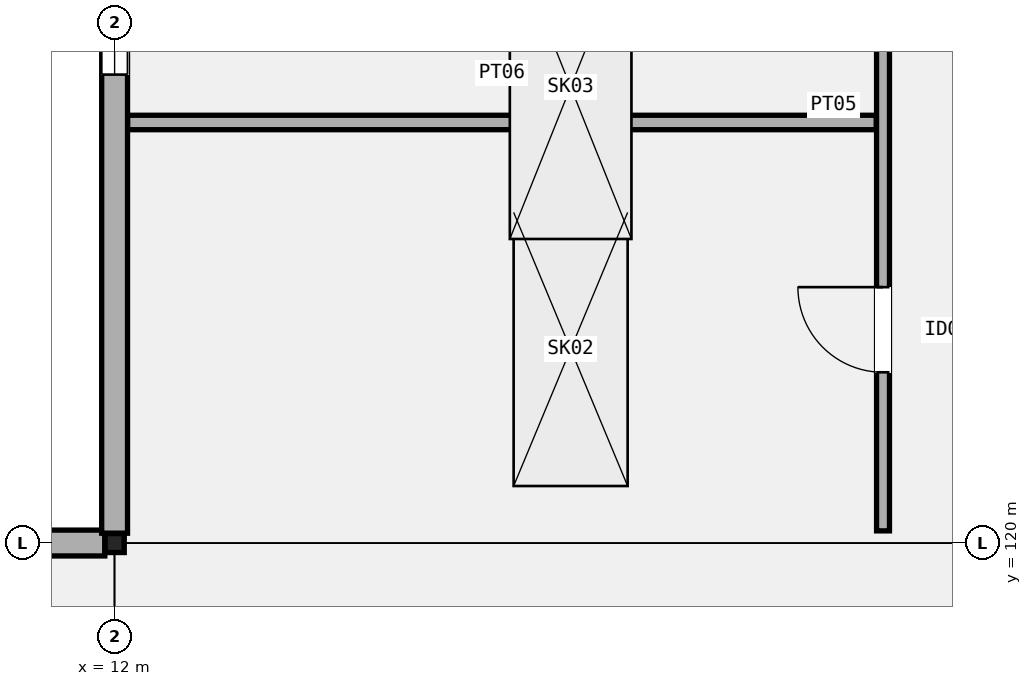
"""IFC4 building model, lengths in metres.
Left out: names, types, materials, properties, quantities, classifications, styles, units other than length and angle.
Written with IfcOpenShell. Run it as: python <this file> out.ifc"""

import sys

from ifc_helpers import new_model, si_unit, direction, frame, frame_2d, origin, origin_2d, place, context, subcontext, project, spatial, rectangle, hollow_rectangle, extrude, element, fill, save


model = new_model("IFC4")
c1 = context("Model", 3, precision=1e-05, world=origin(), true_north=direction((0.0, 1.0)))
c2 = subcontext(c1, "Body", "Model", "MODEL_VIEW")
j1 = project(units=[si_unit("LENGTHUNIT", "METRE"), si_unit("PLANEANGLEUNIT", "RADIAN")], contexts=[c1])
p1 = place(None, origin())
s1 = spatial("IfcSite", under=j1, at=p1, CompositionType="ELEMENT")
p2 = place(p1, origin())
s2 = spatial("IfcBuilding", under=s1, at=p2, CompositionType="ELEMENT")
p3 = place(p2, frame((0.0, 0.0, 25.8)))
s3 = spatial("IfcBuildingStorey", under=s2, at=p3, CompositionType="ELEMENT", Elevation=25.8)
p4 = place(p3, frame((12.0, 120.0, 0.0), z_axis=(0.0, 0.0, 1.0), x_axis=(1.0, 0.0, 0.0)))
e1 = element("IfcColumn", 1, at=p4, inside=s3, PredefinedType="COLUMN", context=c2, shape_type="SweptSolid", body=[
    extrude(hollow_rectangle(XDim=0.25, YDim=0.25, WallThickness=0.012, InnerFilletRadius=0.012, OuterFilletRadius=0.024, at=origin_2d()), origin(), (0.0, 0.0, 1.0), 5.4),
])
p5 = place(p3, frame((0.154, 120.0, 0.0), z_axis=(0.0, 0.0, 1.0), x_axis=(1.0, 0.0, 0.0)))
e2 = element("IfcWall", 2, at=p5, inside=s3, PredefinedType="SOLIDWALL", context=c2, shape_type="SweptSolid", body=[
    extrude(rectangle(XDim=11.717, YDim=0.34, at=frame_2d((5.858, 0.0))), origin(), (0.0, 0.0, 1.0), 4.44),
])
p6 = place(p5, frame((1.5, 0.0, 0.95)))
e3 = element("IfcOpeningElement", 3, at=p6, cuts=e2, PredefinedType="OPENING", context=c2, shape_type="SweptSolid", body=[
    extrude(rectangle(XDim=0.9, YDim=2.7, at=frame_2d((0.45, 1.35))), frame((0.0, 0.18, 0.0), z_axis=(0.0, -1.0, 0.0), x_axis=(1.0, 0.0, 0.0)), (0.0, 0.0, 1.0), 0.36),
])
p7 = place(p3, frame((12.0, 120.129, 0.0), z_axis=(0.0, 0.0, 1.0), x_axis=(0.0, 1.0, 0.0)))
e4 = element("IfcWall", 4, at=p7, inside=s3, PredefinedType="SOLIDWALL", context=c2, shape_type="SweptSolid", body=[
    extrude(rectangle(XDim=11.517, YDim=0.34, at=frame_2d((5.759, 0.0))), origin(), (0.0, 0.0, 1.0), 4.452),
])
p8 = place(p7, frame((6.034, 0.0, 0.95)))
e5 = element("IfcOpeningElement", 5, at=p8, cuts=e4, PredefinedType="OPENING", context=c2, shape_type="SweptSolid", body=[
    extrude(rectangle(XDim=2.25, YDim=1.8, at=frame_2d((1.125, 0.9))), frame((0.0, 0.18, 0.0), z_axis=(0.0, -1.0, 0.0), x_axis=(1.0, 0.0, 0.0)), (0.0, 0.0, 1.0), 0.36),
])
p9 = place(p3, frame((22.11, 120.16, 0.0), z_axis=(0.0, 0.0, 1.0), x_axis=(0.0, 1.0, 0.0)))
e6 = element("IfcWall", 6, at=p9, inside=s3, PredefinedType="PARTITIONING", context=c2, shape_type="SweptSolid", body=[
    extrude(rectangle(XDim=11.68, YDim=0.17, at=frame_2d((5.84, 0.0))), origin(), (0.0, 0.0, 1.0), 4.35),
])
p10 = place(p9, frame((2.086, 0.0, 0.0)))
e7 = element("IfcOpeningElement", 7, at=p10, cuts=e6, PredefinedType="OPENING", context=c2, shape_type="SweptSolid", body=[
    extrude(rectangle(XDim=1.12, YDim=2.18, at=frame_2d((0.56, 1.09))), frame((0.0, 0.095, 0.0), z_axis=(0.0, -1.0, 0.0), x_axis=(1.0, 0.0, 0.0)), (0.0, 0.0, 1.0), 0.19),
])
p11 = place(p9, frame((7.991, 0.0, 0.0)))
e8 = element("IfcOpeningElement", 8, at=p11, cuts=e6, PredefinedType="OPENING", context=c2, shape_type="SweptSolid", body=[
    extrude(rectangle(XDim=1.15, YDim=2.15, at=frame_2d((0.575, 1.075))), frame((0.0, 0.095, 0.0), z_axis=(0.0, -1.0, 0.0), x_axis=(1.0, 0.0, 0.0)), (0.0, 0.0, 1.0), 0.19),
])
p12 = place(p3, frame((12.172, 125.533, 0.0), z_axis=(0.0, 0.0, 1.0), x_axis=(1.0, 0.0, 0.0)))
e9 = element("IfcWall", 9, at=p12, inside=s3, PredefinedType="PARTITIONING", context=c2, shape_type="SweptSolid", body=[
    extrude(rectangle(XDim=9.848, YDim=0.19, at=frame_2d((4.924, 0.0))), origin(), (0.0, 0.0, 1.0), 4.35),
])
p13 = place(p8, origin())
e10 = element("IfcWindow", 10, at=p13, inside=s3, PartitioningType="SINGLE_PANEL", PredefinedType="WINDOW", context=c2, shape_type="SweptSolid", body=[
    extrude(rectangle(XDim=2.25, YDim=1.8, at=frame_2d((1.125, 0.9))), frame((0.0, 0.03, 0.0), z_axis=(0.0, -1.0, 0.0), x_axis=(1.0, 0.0, 0.0)), (0.0, 0.0, 1.0), 0.06),
])
fill(e5, e10)
p14 = place(p2, frame((0.0, 0.0, 31.2)))
p15 = place(p14, frame((0.0, 0.0, -0.36)))
p16 = place(p15, frame((18.0, 122.55, 0.0)))
p17 = place(p16, frame((0.0, 0.0, 0.31)))
e11 = element("IfcWindow", 11, at=p17, inside=s3, PartitioningType="SINGLE_PANEL", PredefinedType="SKYLIGHT", context=c2, shape_type="SweptSolid", body=[
    extrude(rectangle(XDim=3.6, YDim=1.5, at=origin_2d()), origin(), (0.0, 0.0, 1.0), 0.05),
])
p18 = place(p15, frame((18.0, 126.0, 0.0)))
p19 = place(p18, frame((0.0, 0.0, 0.31)))
e12 = element("IfcWindow", 12, at=p19, inside=s3, PartitioningType="SINGLE_PANEL", PredefinedType="SKYLIGHT", context=c2, shape_type="SweptSolid", body=[
    extrude(rectangle(XDim=4.0, YDim=1.6, at=origin_2d()), origin(), (0.0, 0.0, 1.0), 0.05),
])
p20 = place(p10, origin())
e13 = element("IfcDoor", 13, at=p20, inside=s3, OperationType="SINGLE_SWING_RIGHT", PredefinedType="DOOR", context=c2, shape_type="SweptSolid", body=[
    extrude(rectangle(XDim=1.12, YDim=2.18, at=frame_2d((0.56, 1.09))), frame((0.0, 0.025, 0.0), z_axis=(0.0, -1.0, 0.0), x_axis=(1.0, 0.0, 0.0)), (0.0, 0.0, 1.0), 0.05),
])
fill(e7, e13)
save(model, sys.argv[1])
